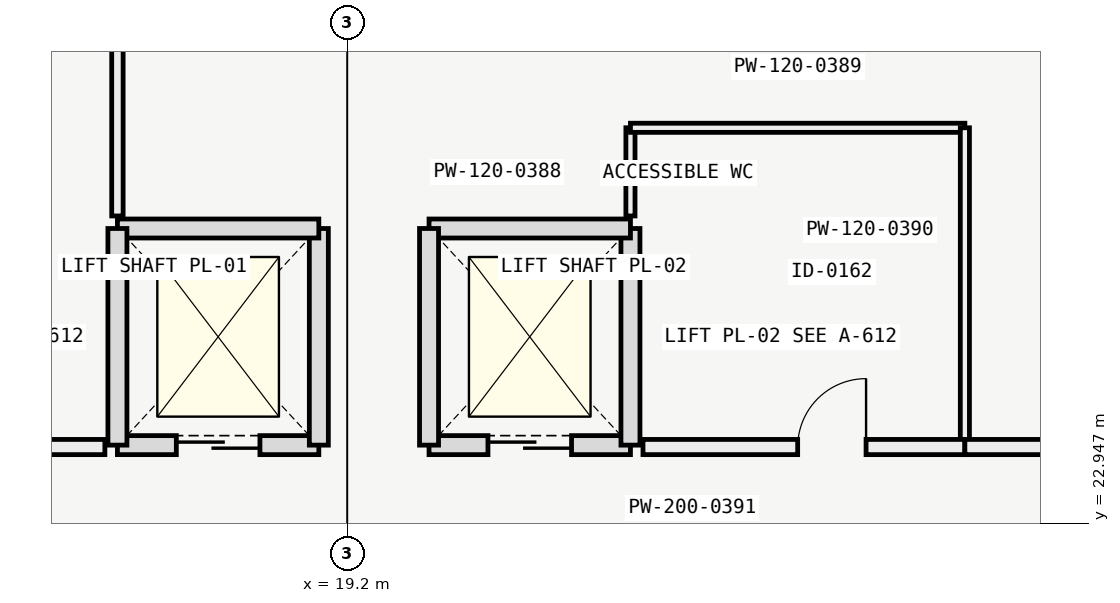
"""IFC4 building model, lengths in metres.
Left out: names, types, materials, properties, quantities, classifications, styles, units other than length and angle.
Written with IfcOpenShell. Run it as: python <this file> out.ifc"""

import sys

from ifc_helpers import new_model, si_unit, direction, frame, frame_2d, origin, place, context, subcontext, project, spatial, rectangle, extrude, element, fill, save


model = new_model("IFC4")
c1 = context("Model", 3, precision=1e-05, world=origin(), true_north=direction((0.0, 1.0)))
c2 = subcontext(c1, "Body", "Model", "MODEL_VIEW")
j1 = project(units=[si_unit("LENGTHUNIT", "METRE"), si_unit("PLANEANGLEUNIT", "RADIAN")], contexts=[c1])
p1 = place(None, origin())
s1 = spatial("IfcSite", under=j1, at=p1, CompositionType="ELEMENT")
p2 = place(p1, origin())
s2 = spatial("IfcBuilding", under=s1, at=p2, CompositionType="ELEMENT")
p3 = place(p2, frame((0.0, 0.0, 9.6)))
s3 = spatial("IfcBuildingStorey", under=s2, at=p3, CompositionType="ELEMENT", Elevation=9.6)
p4 = place(p3, frame((16.175, 23.975, 0.0), z_axis=(0.0, 0.0, 1.0), x_axis=(1.0, 0.0, 0.0)))
e1 = element("IfcWall", 1, at=p4, inside=s3, PredefinedType="SOLIDWALL", context=c2, shape_type="SweptSolid", body=[
    extrude(rectangle(XDim=2.65, YDim=0.25, at=frame_2d((1.325, 0.0))), origin(), (0.0, 0.0, 1.0), 3.95),
])
p5 = place(p4, frame((0.775, 0.0, 0.0)))
e2 = element("IfcOpeningElement", 2, at=p5, cuts=e1, PredefinedType="OPENING", context=c2, shape_type="SweptSolid", body=[
    extrude(rectangle(XDim=1.1, YDim=2.1, at=frame_2d((0.55, 1.05))), frame((0.0, 0.135, 0.0), z_axis=(0.0, -1.0, 0.0), x_axis=(1.0, 0.0, 0.0)), (0.0, 0.0, 1.0), 0.27),
])
p6 = place(p3, frame((18.825, 23.975, 0.0), z_axis=(0.0, 0.0, 1.0), x_axis=(0.0, 1.0, 0.0)))
e3 = element("IfcWall", 3, at=p6, inside=s3, PredefinedType="SOLIDWALL", context=c2, shape_type="SweptSolid", body=[
    extrude(rectangle(XDim=2.85, YDim=0.25, at=frame_2d((1.425, 0.0))), origin(), (0.0, 0.0, 1.0), 3.95),
])
p7 = place(p3, frame((18.825, 26.825, 0.0), z_axis=(0.0, 0.0, 1.0), x_axis=(-1.0, 0.0, 0.0)))
e4 = element("IfcWall", 4, at=p7, inside=s3, PredefinedType="SOLIDWALL", context=c2, shape_type="SweptSolid", body=[
    extrude(rectangle(XDim=2.65, YDim=0.25, at=frame_2d((1.325, 0.0))), origin(), (0.0, 0.0, 1.0), 3.95),
])
p8 = place(p3, frame((16.175, 26.825, 0.0), z_axis=(0.0, 0.0, 1.0), x_axis=(0.0, -1.0, 0.0)))
e5 = element("IfcWall", 5, at=p8, inside=s3, PredefinedType="SOLIDWALL", context=c2, shape_type="SweptSolid", body=[
    extrude(rectangle(XDim=2.85, YDim=0.25, at=frame_2d((1.425, 0.0))), origin(), (0.0, 0.0, 1.0), 3.95),
])
p9 = place(p3, frame((20.275, 23.975, 0.0), z_axis=(0.0, 0.0, 1.0), x_axis=(1.0, 0.0, 0.0)))
e6 = element("IfcWall", 6, at=p9, inside=s3, PredefinedType="SOLIDWALL", context=c2, shape_type="SweptSolid", body=[
    extrude(rectangle(XDim=2.65, YDim=0.25, at=frame_2d((1.325, 0.0))), origin(), (0.0, 0.0, 1.0), 3.95),
])
p10 = place(p9, frame((0.775, 0.0, 0.0)))
e7 = element("IfcOpeningElement", 7, at=p10, cuts=e6, PredefinedType="OPENING", context=c2, shape_type="SweptSolid", body=[
    extrude(rectangle(XDim=1.1, YDim=2.1, at=frame_2d((0.55, 1.05))), frame((0.0, 0.135, 0.0), z_axis=(0.0, -1.0, 0.0), x_axis=(1.0, 0.0, 0.0)), (0.0, 0.0, 1.0), 0.27),
])
p11 = place(p3, frame((22.925, 23.975, 0.0), z_axis=(0.0, 0.0, 1.0), x_axis=(0.0, 1.0, 0.0)))
e8 = element("IfcWall", 8, at=p11, inside=s3, PredefinedType="SOLIDWALL", context=c2, shape_type="SweptSolid", body=[
    extrude(rectangle(XDim=2.85, YDim=0.25, at=frame_2d((1.425, 0.0))), origin(), (0.0, 0.0, 1.0), 3.95),
])
p12 = place(p3, frame((22.925, 26.825, 0.0), z_axis=(0.0, 0.0, 1.0), x_axis=(-1.0, 0.0, 0.0)))
e9 = element("IfcWall", 9, at=p12, inside=s3, PredefinedType="SOLIDWALL", context=c2, shape_type="SweptSolid", body=[
    extrude(rectangle(XDim=2.65, YDim=0.25, at=frame_2d((1.325, 0.0))), origin(), (0.0, 0.0, 1.0), 3.95),
])
p13 = place(p3, frame((20.275, 26.825, 0.0), z_axis=(0.0, 0.0, 1.0), x_axis=(0.0, -1.0, 0.0)))
e10 = element("IfcWall", 10, at=p13, inside=s3, PredefinedType="SOLIDWALL", context=c2, shape_type="SweptSolid", body=[
    extrude(rectangle(XDim=2.85, YDim=0.25, at=frame_2d((1.425, 0.0))), origin(), (0.0, 0.0, 1.0), 3.95),
])
p14 = place(p3, frame((22.925, 26.99, 0.0), z_axis=(0.0, 0.0, 1.0), x_axis=(0.0, 1.0, 0.0)))
e11 = element("IfcWall", 11, at=p14, inside=s3, PredefinedType="PARTITIONING", context=c2, shape_type="SweptSolid", body=[
    extrude(rectangle(XDim=1.16, YDim=0.12, at=frame_2d((0.58, 0.0))), origin(), (0.0, 0.0, 1.0), 3.85),
])
p15 = place(p3, frame((22.925, 28.15, 0.0), z_axis=(0.0, 0.0, 1.0), x_axis=(1.0, 0.0, 0.0)))
e12 = element("IfcWall", 12, at=p15, inside=s3, PredefinedType="PARTITIONING", context=c2, shape_type="SweptSolid", body=[
    extrude(rectangle(XDim=4.4, YDim=0.12, at=frame_2d((2.2, 0.0))), origin(), (0.0, 0.0, 1.0), 3.85),
])
p16 = place(p3, frame((27.325, 23.95, 0.0), z_axis=(0.0, 0.0, 1.0), x_axis=(0.0, 1.0, 0.0)))
e13 = element("IfcWall", 13, at=p16, inside=s3, PredefinedType="PARTITIONING", context=c2, shape_type="SweptSolid", body=[
    extrude(rectangle(XDim=4.2, YDim=0.12, at=frame_2d((2.1, 0.0))), origin(), (0.0, 0.0, 1.0), 3.85),
])
p17 = place(p3, frame((23.09, 23.95, 0.0), z_axis=(0.0, 0.0, 1.0), x_axis=(1.0, 0.0, 0.0)))
e14 = element("IfcWall", 14, at=p17, inside=s3, PredefinedType="PARTITIONING", context=c2, shape_type="SweptSolid", body=[
    extrude(rectangle(XDim=4.235, YDim=0.2, at=frame_2d((2.117, 0.0))), origin(), (0.0, 0.0, 1.0), 3.85),
])
p18 = place(p17, frame((2.035, 0.0, 0.0)))
e15 = element("IfcOpeningElement", 15, at=p18, cuts=e14, PredefinedType="OPENING", context=c2, shape_type="SweptSolid", body=[
    extrude(rectangle(XDim=0.9, YDim=2.05, at=frame_2d((0.45, 1.025))), frame((0.0, 0.11, 0.0), z_axis=(0.0, -1.0, 0.0), x_axis=(1.0, 0.0, 0.0)), (0.0, 0.0, 1.0), 0.22),
])
p19 = place(p3, frame((16.175, 26.99, 0.0), z_axis=(0.0, 0.0, 1.0), x_axis=(0.0, 1.0, 0.0)))
e16 = element("IfcWall", 16, at=p19, inside=s3, PredefinedType="PARTITIONING", context=c2, shape_type="SweptSolid", body=[
    extrude(rectangle(XDim=13.66, YDim=0.15, at=frame_2d((6.83, 0.0))), origin(), (0.0, 0.0, 1.0), 3.33),
])
p20 = place(p3, frame((0.15, 23.95, 0.0), z_axis=(0.0, 0.0, 1.0), x_axis=(1.0, 0.0, 0.0)))
e17 = element("IfcWall", 17, at=p20, inside=s3, PredefinedType="PARTITIONING", context=c2, shape_type="SweptSolid", body=[
    extrude(rectangle(XDim=15.86, YDim=0.2, at=frame_2d((7.93, 0.0))), origin(), (0.0, 0.0, 1.0), 3.28),
])
p21 = place(p20, frame((6.05, 0.0, 0.0)))
e18 = element("IfcOpeningElement", 18, at=p21, cuts=e17, PredefinedType="OPENING", context=c2, shape_type="SweptSolid", body=[
    extrude(rectangle(XDim=1.5, YDim=2.2, at=frame_2d((0.75, 1.1))), frame((0.0, 0.11, 0.0), z_axis=(0.0, -1.0, 0.0), x_axis=(1.0, 0.0, 0.0)), (0.0, 0.0, 1.0), 0.22),
])
p22 = place(p20, frame((13.0, 0.0, 0.0)))
e19 = element("IfcOpeningElement", 19, at=p22, cuts=e17, PredefinedType="OPENING", context=c2, shape_type="SweptSolid", body=[
    extrude(rectangle(XDim=0.92, YDim=2.1, at=frame_2d((0.46, 1.05))), frame((0.0, 0.11, 0.0), z_axis=(0.0, -1.0, 0.0), x_axis=(1.0, 0.0, 0.0)), (0.0, 0.0, 1.0), 0.22),
])
p23 = place(p3, frame((27.325, 23.95, 0.0), z_axis=(0.0, 0.0, 1.0), x_axis=(1.0, 0.0, 0.0)))
e20 = element("IfcWall", 20, at=p23, inside=s3, PredefinedType="PARTITIONING", context=c2, shape_type="SweptSolid", body=[
    extrude(rectangle(XDim=6.985, YDim=0.2, at=frame_2d((3.493, 0.0))), origin(), (0.0, 0.0, 1.0), 3.28),
])
p24 = place(p23, frame((4.1, 0.0, 0.0)))
e21 = element("IfcOpeningElement", 21, at=p24, cuts=e20, PredefinedType="OPENING", context=c2, shape_type="SweptSolid", body=[
    extrude(rectangle(XDim=1.5, YDim=2.2, at=frame_2d((0.75, 1.1))), frame((0.0, 0.11, 0.0), z_axis=(0.0, -1.0, 0.0), x_axis=(1.0, 0.0, 0.0)), (0.0, 0.0, 1.0), 0.22),
])
p25 = place(p5, origin())
e22 = element("IfcDoor", 22, at=p25, inside=s3, OperationType="SLIDING_TO_LEFT", PredefinedType="DOOR", context=c2, shape_type="SweptSolid", body=[
    extrude(rectangle(XDim=1.1, YDim=2.1, at=frame_2d((0.55, 1.05))), frame((0.0, 0.025, 0.0), z_axis=(0.0, -1.0, 0.0), x_axis=(1.0, 0.0, 0.0)), (0.0, 0.0, 1.0), 0.05),
])
fill(e2, e22)
p26 = place(p10, origin())
e23 = element("IfcDoor", 23, at=p26, inside=s3, OperationType="SLIDING_TO_LEFT", PredefinedType="DOOR", context=c2, shape_type="SweptSolid", body=[
    extrude(rectangle(XDim=1.1, YDim=2.1, at=frame_2d((0.55, 1.05))), frame((0.0, 0.025, 0.0), z_axis=(0.0, -1.0, 0.0), x_axis=(1.0, 0.0, 0.0)), (0.0, 0.0, 1.0), 0.05),
])
fill(e7, e23)
p27 = place(p18, origin())
e24 = element("IfcDoor", 24, at=p27, inside=s3, OperationType="SINGLE_SWING_RIGHT", PredefinedType="DOOR", context=c2, shape_type="SweptSolid", body=[
    extrude(rectangle(XDim=0.9, YDim=2.05, at=frame_2d((0.45, 1.025))), frame((0.0, 0.025, 0.0), z_axis=(0.0, -1.0, 0.0), x_axis=(1.0, 0.0, 0.0)), (0.0, 0.0, 1.0), 0.05),
])
fill(e15, e24)
save(model, sys.argv[1])
